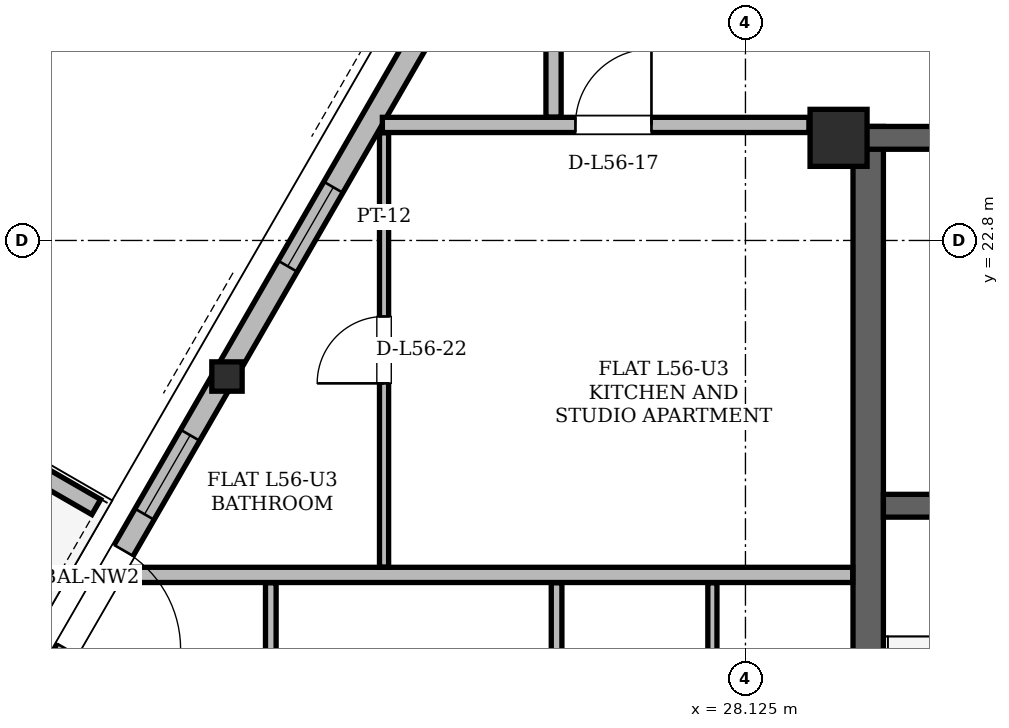
"""IFC4 building model, lengths in metres.
Left out: names, types, materials, properties, quantities, classifications, styles, units other than length and angle.
Written with IfcOpenShell. Run it as: python <this file> out.ifc"""

import sys

from ifc_helpers import new_model, si_unit, direction, frame, frame_2d, origin, origin_2d, place, context, subcontext, project, spatial, polyline, rectangle, hollow_rectangle, i_section, outline, extrude, element, fill, save


model = new_model("IFC4")
c1 = context("Model", 3, precision=1e-05, world=origin(), true_north=direction((0.0, 1.0)))
c2 = subcontext(c1, "Body", "Model", "MODEL_VIEW")
j1 = project(units=[si_unit("LENGTHUNIT", "METRE"), si_unit("PLANEANGLEUNIT", "RADIAN")], contexts=[c1])
p1 = place(None, origin())
s1 = spatial("IfcSite", under=j1, at=p1, CompositionType="ELEMENT")
p2 = place(p1, origin())
s2 = spatial("IfcBuilding", under=s1, at=p2, CompositionType="ELEMENT")
p3 = place(p2, frame((0.0, 0.0, 212.7)))
s3 = spatial("IfcBuildingStorey", under=s2, at=p3, CompositionType="ELEMENT", Elevation=212.7)
p4 = place(p3, frame((29.35, 24.15, 0.0), z_axis=(0.0, 0.0, 1.0), x_axis=(1.0, 0.0, 0.0)))
e1 = element("IfcColumn", 1, at=p4, inside=s3, PredefinedType="COLUMN", context=c2, shape_type="SweptSolid", body=[
    extrude(hollow_rectangle(XDim=0.75, YDim=0.75, WallThickness=0.06, at=origin_2d()), origin(), (0.0, 0.0, 1.0), 3.6),
])
p5 = place(p3, frame((21.277, 21.031, 0.005), z_axis=(0.014615287343, -0.011964142197, 0.999821610427), x_axis=(0.633433758122, 0.773796920433, 0.0)))
e2 = element("IfcColumn", 2, at=p5, inside=s3, PredefinedType="COLUMN", context=c2, shape_type="SweptSolid", body=[
    extrude(i_section(OverallWidth=0.399, OverallDepth=0.386, WebThickness=0.021, FlangeThickness=0.033, at=origin_2d()), origin(), (0.0, 0.0, 1.0), 3.592),
])
p6 = place(p3, frame((29.74, 11.0, 0.0), z_axis=(0.0, 0.0, 1.0), x_axis=(0.0, 1.0, 0.0)))
e3 = element("IfcWall", 3, at=p6, inside=s3, PredefinedType="SHEAR", context=c2, shape_type="SweptSolid", body=[
    extrude(rectangle(XDim=13.3, YDim=0.4, at=frame_2d((6.65, 0.0))), origin(), (0.0, 0.0, 1.0), 3.38),
])
p7 = place(p3, frame((29.65, 24.15, 0.0), z_axis=(0.0, 0.0, 1.0), x_axis=(1.0, 0.0, 0.0)))
e4 = element("IfcWall", 4, at=p7, inside=s3, PredefinedType="SHEAR", context=c2, shape_type="SweptSolid", body=[
    extrude(rectangle(XDim=15.7, YDim=0.3, at=frame_2d((7.85, 0.0))), origin(), (0.0, 0.0, 1.0), 3.38),
])
p8 = place(p7, frame((1.7, 0.0, 0.0)))
e5 = element("IfcOpeningElement", 5, at=p8, cuts=e4, PredefinedType="OPENING", context=c2, shape_type="SweptSolid", body=[
    extrude(rectangle(XDim=1.2, YDim=2.2, at=frame_2d((0.6, 1.1))), frame((0.0, 0.15, 0.0), z_axis=(0.0, -1.0, 0.0), x_axis=(1.0, 0.0, 0.0)), (0.0, 0.0, 1.0), 0.3),
])
p9 = place(p7, frame((12.8, 0.0, 0.0)))
e6 = element("IfcOpeningElement", 6, at=p9, cuts=e4, PredefinedType="OPENING", context=c2, shape_type="SweptSolid", body=[
    extrude(rectangle(XDim=1.2, YDim=2.2, at=frame_2d((0.6, 1.1))), frame((0.0, 0.15, 0.0), z_axis=(0.0, -1.0, 0.0), x_axis=(1.0, 0.0, 0.0)), (0.0, 0.0, 1.0), 0.3),
])
p10 = place(p7, frame((7.4, 0.0, 0.0)))
e7 = element("IfcOpeningElement", 7, at=p10, cuts=e4, PredefinedType="OPENING", context=c2, shape_type="SweptSolid", body=[
    extrude(rectangle(XDim=0.9, YDim=2.05, at=frame_2d((0.45, 1.025))), frame((0.0, 0.15, 0.0), z_axis=(0.0, -1.0, 0.0), x_axis=(1.0, 0.0, 0.0)), (0.0, 0.0, 1.0), 0.3),
])
p11 = place(p3, frame((29.94, 19.31, 0.0), z_axis=(0.0, 0.0, 1.0), x_axis=(1.0, 0.0, 0.0)))
e8 = element("IfcWall", 8, at=p11, inside=s3, PredefinedType="SHEAR", context=c2, shape_type="SweptSolid", body=[
    extrude(rectangle(XDim=4.01, YDim=0.3, at=frame_2d((2.005, 0.0))), origin(), (0.0, 0.0, 1.0), 3.38),
])
p12 = place(p11, frame((1.01, 0.0, 0.0)))
e9 = element("IfcOpeningElement", 9, at=p12, cuts=e8, PredefinedType="OPENING", context=c2, shape_type="SweptSolid", body=[
    extrude(rectangle(XDim=1.4, YDim=2.2, at=frame_2d((0.7, 1.1))), frame((0.0, 0.15, 0.0), z_axis=(0.0, -1.0, 0.0), x_axis=(1.0, 0.0, 0.0)), (0.0, 0.0, 1.0), 0.3),
])
p13 = place(p3, frame((34.06, 43.173, 0.0), z_axis=(0.0, 0.0, 1.0), x_axis=(-0.499999040053, -0.866025958009, 0.0)))
e10 = element("IfcWall", 10, at=p13, inside=s3, PredefinedType="SOLIDWALL", context=c2, shape_type="SweptSolid", body=[
    extrude(rectangle(XDim=36.523, YDim=0.29, at=frame_2d((18.261, 0.0))), origin(), (0.0, 0.0, 1.0), 2.677),
])
p14 = place(p13, frame((8.034, 0.0, 0.0)))
e11 = element("IfcOpeningElement", 11, at=p14, cuts=e10, PredefinedType="OPENING", context=c2, shape_type="SweptSolid", body=[
    extrude(rectangle(XDim=1.5, YDim=2.2, at=frame_2d((0.75, 1.1))), frame((0.0, 0.145, 0.0), z_axis=(0.0, -1.0, 0.0), x_axis=(1.0, 0.0, 0.0)), (0.0, 0.0, 1.0), 0.29),
])
p15 = place(p13, frame((28.233, 0.0, 0.0)))
e12 = element("IfcOpeningElement", 12, at=p15, cuts=e10, PredefinedType="OPENING", context=c2, shape_type="SweptSolid", body=[
    extrude(rectangle(XDim=1.5, YDim=2.2, at=frame_2d((0.75, 1.1))), frame((0.0, 0.145, 0.0), z_axis=(0.0, -1.0, 0.0), x_axis=(1.0, 0.0, 0.0)), (0.0, 0.0, 1.0), 0.29),
])
p16 = place(p13, frame((32.257, 0.0, 0.85)))
e13 = element("IfcOpeningElement", 13, at=p16, cuts=e10, PredefinedType="OPENING", context=c2, shape_type="SweptSolid", body=[
    extrude(rectangle(XDim=2.2, YDim=1.717, at=frame_2d((1.1, 0.858))), frame((0.0, 0.145, 0.0), z_axis=(0.0, -1.0, 0.0), x_axis=(1.0, 0.0, 0.0)), (0.0, 0.0, 1.0), 0.29),
])
p17 = place(p13, frame((22.716, 0.0, 0.85)))
e14 = element("IfcOpeningElement", 14, at=p17, cuts=e10, PredefinedType="OPENING", context=c2, shape_type="SweptSolid", body=[
    extrude(rectangle(XDim=1.2, YDim=1.48, at=frame_2d((0.6, 0.74))), frame((0.0, 0.145, 0.0), z_axis=(0.0, -1.0, 0.0), x_axis=(1.0, 0.0, 0.0)), (0.0, 0.0, 1.0), 0.29),
])
p18 = place(p13, frame((26.483, 0.0, 0.85)))
e15 = element("IfcOpeningElement", 15, at=p18, cuts=e10, PredefinedType="OPENING", context=c2, shape_type="SweptSolid", body=[
    extrude(rectangle(XDim=1.2, YDim=1.48, at=frame_2d((0.6, 0.74))), frame((0.0, 0.145, 0.0), z_axis=(0.0, -1.0, 0.0), x_axis=(1.0, 0.0, 0.0)), (0.0, 0.0, 1.0), 0.29),
])
p19 = place(p3, frame((19.583, 19.293, 0.0), z_axis=(0.0, 0.0, 1.0), x_axis=(-0.866012356593, 0.500022597718, 0.0)))
e16 = element("IfcWall", 16, at=p19, inside=s3, PredefinedType="PARAPET", context=c2, shape_type="SweptSolid", body=[
    extrude(outline(polyline([(0.0, 0.0), (2.042, 0.0), (2.042, 1.1), (0.0, 1.32), (0.0, 0.0)])), frame((0.0, 0.115, 0.0), z_axis=(0.0, -1.0, 0.0), x_axis=(1.0, 0.0, 0.0)), (0.0, 0.0, 1.0), 0.23),
])
p20 = place(p3, frame((19.93, 18.4, 0.0), z_axis=(0.0, 0.0, 1.0), x_axis=(1.0, 0.0, 0.0)))
e17 = element("IfcWall", 17, at=p20, inside=s3, PredefinedType="PARTITIONING", context=c2, shape_type="SweptSolid", body=[
    extrude(rectangle(XDim=9.606, YDim=0.2, at=frame_2d((4.803, 0.0))), origin(), (0.0, 0.0, 1.0), 2.52),
])
p21 = place(p3, frame((23.348, 24.32, 0.0), z_axis=(0.0, 0.0, 1.0), x_axis=(1.0, 0.0, 0.0)))
e18 = element("IfcWall", 18, at=p21, inside=s3, PredefinedType="PARTITIONING", context=c2, shape_type="SweptSolid", body=[
    extrude(rectangle(XDim=5.612, YDim=0.2, at=frame_2d((2.806, 0.0))), origin(), (0.0, 0.0, 1.0), 3.38),
])
p22 = place(p21, frame((2.54, 0.0, 0.0)))
e19 = element("IfcOpeningElement", 19, at=p22, cuts=e18, PredefinedType="OPENING", context=c2, shape_type="SweptSolid", body=[
    extrude(rectangle(XDim=1.0, YDim=2.18, at=frame_2d((0.5, 1.09))), frame((0.0, 0.1, 0.0), z_axis=(0.0, -1.0, 0.0), x_axis=(1.0, 0.0, 0.0)), (0.0, 0.0, 1.0), 0.2),
])
p23 = place(p3, frame((21.88, 12.914, 0.0), z_axis=(0.0, 0.0, 1.0), x_axis=(0.0, 1.0, 0.0)))
e20 = element("IfcWall", 20, at=p23, inside=s3, PredefinedType="PARTITIONING", context=c2, shape_type="SweptSolid", body=[
    extrude(rectangle(XDim=5.382, YDim=0.14, at=frame_2d((2.691, 0.0))), origin(), (0.0, 0.0, 1.0), 3.38),
])
p24 = place(p3, frame((23.37, 18.504, 0.0), z_axis=(0.0, 0.0, 1.0), x_axis=(0.0, 1.0, 0.0)))
e21 = element("IfcWall", 21, at=p24, inside=s3, PredefinedType="PARTITIONING", context=c2, shape_type="SweptSolid", body=[
    extrude(rectangle(XDim=5.712, YDim=0.12, at=frame_2d((2.856, 0.0))), origin(), (0.0, 0.0, 1.0), 3.38),
])
p25 = place(p24, frame((2.416, 0.0, 0.0)))
e22 = element("IfcOpeningElement", 22, at=p25, cuts=e21, PredefinedType="OPENING", context=c2, shape_type="SweptSolid", body=[
    extrude(rectangle(XDim=0.88, YDim=2.08, at=frame_2d((0.44, 1.04))), frame((0.0, 0.06, 0.0), z_axis=(0.0, -1.0, 0.0), x_axis=(1.0, 0.0, 0.0)), (0.0, 0.0, 1.0), 0.12),
])
p26 = place(p3, frame((25.6, 24.424, 0.0), z_axis=(0.0, 0.0, 1.0), x_axis=(0.0, 1.0, 0.0)))
e23 = element("IfcWall", 23, at=p26, inside=s3, PredefinedType="PARTITIONING", context=c2, shape_type="SweptSolid", body=[
    extrude(rectangle(XDim=1.442, YDim=0.2, at=frame_2d((0.721, 0.0))), origin(), (0.0, 0.0, 1.0), 3.38),
])
p27 = place(p3, frame((25.64, 12.914, 0.0), z_axis=(0.0, 0.0, 1.0), x_axis=(0.0, 1.0, 0.0)))
e24 = element("IfcWall", 24, at=p27, inside=s3, PredefinedType="PARTITIONING", context=c2, shape_type="SweptSolid", body=[
    extrude(rectangle(XDim=5.382, YDim=0.14, at=frame_2d((2.691, 0.0))), origin(), (0.0, 0.0, 1.0), 3.38),
])
p28 = place(p3, frame((27.69, 12.914, 0.0), z_axis=(0.0, 0.0, 1.0), x_axis=(0.0, 1.0, 0.0)))
e25 = element("IfcWall", 25, at=p28, inside=s3, PredefinedType="PARTITIONING", context=c2, shape_type="SweptSolid", body=[
    extrude(rectangle(XDim=5.382, YDim=0.12, at=frame_2d((2.691, 0.0))), origin(), (0.0, 0.0, 1.0), 3.38),
])
p29 = place(p15, origin())
e26 = element("IfcDoor", 26, at=p29, inside=s3, OperationType="SINGLE_SWING_RIGHT", PredefinedType="DOOR", context=c2, shape_type="SweptSolid", body=[
    extrude(rectangle(XDim=1.5, YDim=2.2, at=frame_2d((0.75, 1.1))), frame((0.0, 0.025, 0.0), z_axis=(0.0, -1.0, 0.0), x_axis=(1.0, 0.0, 0.0)), (0.0, 0.0, 1.0), 0.05),
])
fill(e12, e26)
p30 = place(p17, origin())
e27 = element("IfcWindow", 27, at=p30, inside=s3, PartitioningType="SINGLE_PANEL", PredefinedType="WINDOW", context=c2, shape_type="SweptSolid", body=[
    extrude(rectangle(XDim=1.2, YDim=1.48, at=frame_2d((0.6, 0.74))), frame((0.0, 0.03, 0.0), z_axis=(0.0, -1.0, 0.0), x_axis=(1.0, 0.0, 0.0)), (0.0, 0.0, 1.0), 0.06),
])
fill(e14, e27)
p31 = place(p18, origin())
e28 = element("IfcWindow", 28, at=p31, inside=s3, PartitioningType="SINGLE_PANEL", PredefinedType="WINDOW", context=c2, shape_type="SweptSolid", body=[
    extrude(rectangle(XDim=1.2, YDim=1.48, at=frame_2d((0.6, 0.74))), frame((0.0, 0.03, 0.0), z_axis=(0.0, -1.0, 0.0), x_axis=(1.0, 0.0, 0.0)), (0.0, 0.0, 1.0), 0.06),
])
fill(e15, e28)
p32 = place(p22, origin())
e29 = element("IfcDoor", 29, at=p32, inside=s3, OperationType="SINGLE_SWING_RIGHT", PredefinedType="DOOR", context=c2, shape_type="SweptSolid", body=[
    extrude(rectangle(XDim=1.0, YDim=2.18, at=frame_2d((0.5, 1.09))), frame((0.0, 0.025, 0.0), z_axis=(0.0, -1.0, 0.0), x_axis=(1.0, 0.0, 0.0)), (0.0, 0.0, 1.0), 0.05),
])
fill(e19, e29)
p33 = place(p25, origin())
e30 = element("IfcDoor", 30, at=p33, inside=s3, OperationType="SINGLE_SWING_LEFT", PredefinedType="DOOR", context=c2, shape_type="SweptSolid", body=[
    extrude(rectangle(XDim=0.88, YDim=2.08, at=frame_2d((0.44, 1.04))), frame((0.0, 0.025, 0.0), z_axis=(0.0, -1.0, 0.0), x_axis=(1.0, 0.0, 0.0)), (0.0, 0.0, 1.0), 0.05),
])
fill(e22, e30)
save(model, sys.argv[1])
